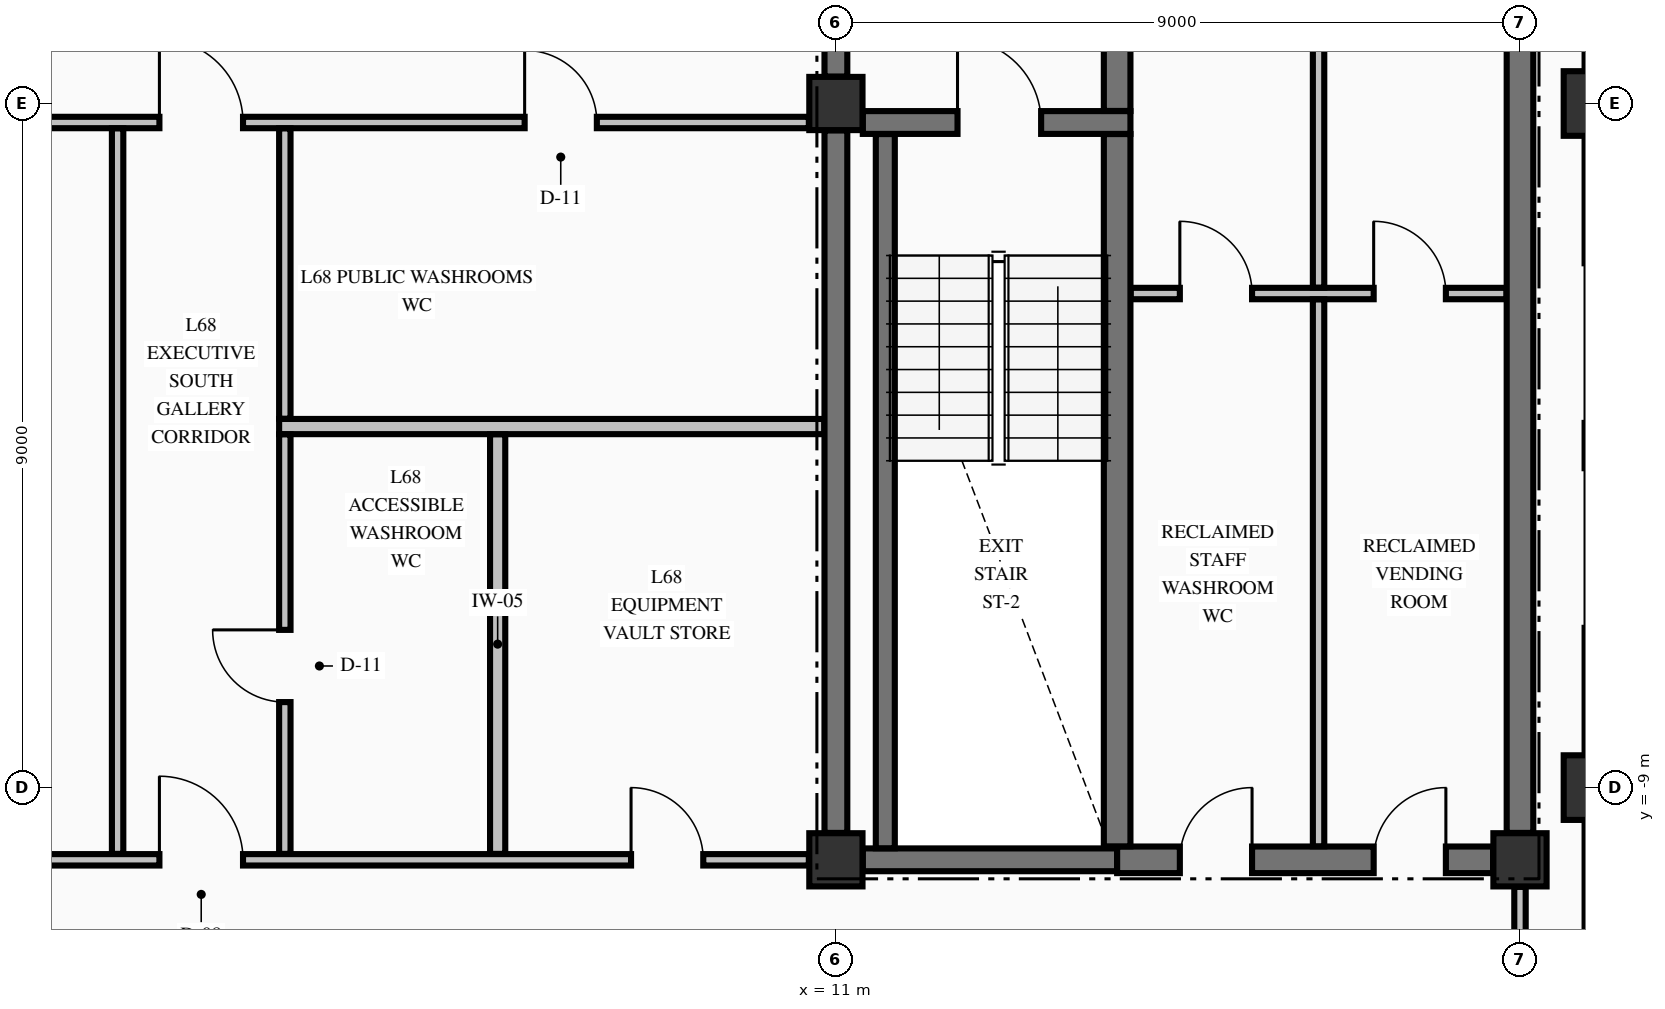
"""IFC4 building model, lengths in metres.
Left out: names, types, materials, properties, quantities, classifications, styles, units other than length and angle.
Written with IfcOpenShell. Run it as: python <this file> out.ifc"""

import sys

from ifc_helpers import new_model, si_unit, direction, frame, frame_2d, origin, origin_2d, place, context, subcontext, project, spatial, rectangle, extrude, element, fill, save


model = new_model("IFC4")
c1 = context("Model", 3, precision=1e-05, world=origin(), true_north=direction((0.0, 1.0)))
c2 = subcontext(c1, "Body", "Model", "MODEL_VIEW")
j1 = project(units=[si_unit("LENGTHUNIT", "METRE"), si_unit("PLANEANGLEUNIT", "RADIAN")], contexts=[c1])
p1 = place(None, origin())
s1 = spatial("IfcSite", under=j1, at=p1, CompositionType="ELEMENT")
p2 = place(p1, origin())
s2 = spatial("IfcBuilding", under=s1, at=p2, CompositionType="ELEMENT")
p3 = place(p2, frame((0.0, 0.0, 257.66)))
s3 = spatial("IfcBuildingStorey", under=s2, at=p3, CompositionType="ELEMENT", Elevation=257.66)
for number, where, z_axis, x_axis in (
    (1, (21.0, -9.0, -0.25), (0.0, 0.0, 1.0), (1.0, 0.0, 0.0)),
    (2, (21.0, 0.0, -0.25), (0.0, 0.0, 1.0), (1.0, 0.0, 0.0)),
):
    element("IfcColumn", number, at=place(p3, frame(where, z_axis=z_axis, x_axis=x_axis)), inside=s3, PredefinedType="COLUMN", context=c2, shape_type="SweptSolid", body=[
        extrude(rectangle(XDim=0.85, YDim=0.85, at=origin_2d()), origin(), (0.0, 0.0, 1.0), 3.23),
    ])
for number, where, z_axis, x_axis in (
    (3, (11.0, -9.95, -0.25), (0.0, 0.0, 1.0), (1.0, 0.0, 0.0)),
    (4, (11.0, 0.0, -0.25), (0.0, 0.0, 1.0), (1.0, 0.0, 0.0)),
    (5, (20.0, -9.95, -0.25), (0.0, 0.0, 1.0), (1.0, 0.0, 0.0)),
):
    element("IfcColumn", number, at=place(p3, frame(where, z_axis=z_axis, x_axis=x_axis)), inside=s3, PredefinedType="COLUMN", context=c2, shape_type="SweptSolid", body=[
        extrude(rectangle(XDim=0.7, YDim=0.7, at=origin_2d()), origin(), (0.0, 0.0, 1.0), 3.23),
    ])
p4 = place(p3, frame((21.0, -17.545, 0.0), z_axis=(0.0, 0.0, 1.0), x_axis=(0.0, 1.0, 0.0)))
e6 = element("IfcWall", 6, at=p4, inside=s3, PredefinedType="STANDARD", context=c2, shape_type="SweptSolid", body=[
    extrude(rectangle(XDim=8.09, YDim=0.3, at=frame_2d((4.045, 0.0))), origin(), (0.0, 0.0, 1.0), 2.372),
])
p5 = place(p3, frame((21.0, -8.545, 0.0), z_axis=(0.0, 0.0, 1.0), x_axis=(0.0, 1.0, 0.0)))
e7 = element("IfcWall", 7, at=p5, inside=s3, PredefinedType="STANDARD", context=c2, shape_type="SweptSolid", body=[
    extrude(rectangle(XDim=8.09, YDim=0.3, at=frame_2d((4.045, 0.0))), origin(), (0.0, 0.0, 1.0), 2.372),
])
p6 = place(p5, frame((1.647, 0.0, 0.7)))
e8 = element("IfcOpeningElement", 8, at=p6, cuts=e7, PredefinedType="OPENING", context=c2, shape_type="SweptSolid", body=[
    extrude(rectangle(XDim=2.1, YDim=1.5, at=frame_2d((1.05, 0.75))), frame((0.0, 0.16, 0.0), z_axis=(0.0, -1.0, 0.0), x_axis=(1.0, 0.0, 0.0)), (0.0, 0.0, 1.0), 0.32),
])
p7 = place(p5, frame((4.343, 0.0, 0.7)))
e9 = element("IfcOpeningElement", 9, at=p7, cuts=e7, PredefinedType="OPENING", context=c2, shape_type="SweptSolid", body=[
    extrude(rectangle(XDim=2.1, YDim=1.5, at=frame_2d((1.05, 0.75))), frame((0.0, 0.16, 0.0), z_axis=(0.0, -1.0, 0.0), x_axis=(1.0, 0.0, 0.0)), (0.0, 0.0, 1.0), 0.32),
])
p8 = place(p3, frame((21.0, 0.455, 0.0), z_axis=(0.0, 0.0, 1.0), x_axis=(0.0, 1.0, 0.0)))
e10 = element("IfcWall", 10, at=p8, inside=s3, PredefinedType="STANDARD", context=c2, shape_type="SweptSolid", body=[
    extrude(rectangle(XDim=8.09, YDim=0.3, at=frame_2d((4.045, 0.0))), origin(), (0.0, 0.0, 1.0), 2.372),
])
p9 = place(p8, frame((1.647, 0.0, 0.7)))
e11 = element("IfcOpeningElement", 11, at=p9, cuts=e10, PredefinedType="OPENING", context=c2, shape_type="SweptSolid", body=[
    extrude(rectangle(XDim=2.1, YDim=1.5, at=frame_2d((1.05, 0.75))), frame((0.0, 0.16, 0.0), z_axis=(0.0, -1.0, 0.0), x_axis=(1.0, 0.0, 0.0)), (0.0, 0.0, 1.0), 0.32),
])
p10 = place(p8, frame((4.343, 0.0, 0.7)))
e12 = element("IfcOpeningElement", 12, at=p10, cuts=e10, PredefinedType="OPENING", context=c2, shape_type="SweptSolid", body=[
    extrude(rectangle(XDim=2.1, YDim=1.5, at=frame_2d((1.05, 0.75))), frame((0.0, 0.16, 0.0), z_axis=(0.0, -1.0, 0.0), x_axis=(1.0, 0.0, 0.0)), (0.0, 0.0, 1.0), 0.32),
])
p11 = place(p3, frame((11.354, -9.95, 0.0), z_axis=(0.0, 0.0, 1.0), x_axis=(1.0, 0.0, 0.0)))
e13 = element("IfcWall", 13, at=p11, inside=s3, PredefinedType="SHEAR", context=c2, shape_type="SweptSolid", body=[
    extrude(rectangle(XDim=3.346, YDim=0.3, at=frame_2d((1.673, 0.0))), origin(), (0.0, 0.0, 1.0), 2.98),
])
p12 = place(p3, frame((14.7, -9.95, 0.0), z_axis=(0.0, 0.0, 1.0), x_axis=(1.0, 0.0, 0.0)))
e14 = element("IfcWall", 14, at=p12, inside=s3, PredefinedType="SHEAR", context=c2, shape_type="SweptSolid", body=[
    extrude(rectangle(XDim=4.946, YDim=0.35, at=frame_2d((2.473, 0.0))), origin(), (0.0, 0.0, 1.0), 2.98),
])
p13 = place(p12, frame((0.825, 0.0, 0.0)))
e15 = element("IfcOpeningElement", 15, at=p13, cuts=e14, PredefinedType="OPENING", context=c2, shape_type="SweptSolid", body=[
    extrude(rectangle(XDim=0.95, YDim=2.15, at=frame_2d((0.475, 1.075))), frame((0.0, 0.185, 0.0), z_axis=(0.0, -1.0, 0.0), x_axis=(1.0, 0.0, 0.0)), (0.0, 0.0, 1.0), 0.37),
])
p14 = place(p12, frame((3.375, 0.0, 0.0)))
e16 = element("IfcOpeningElement", 16, at=p14, cuts=e14, PredefinedType="OPENING", context=c2, shape_type="SweptSolid", body=[
    extrude(rectangle(XDim=0.95, YDim=2.15, at=frame_2d((0.475, 1.075))), frame((0.0, 0.185, 0.0), z_axis=(0.0, -1.0, 0.0), x_axis=(1.0, 0.0, 0.0)), (0.0, 0.0, 1.0), 0.37),
])
p15 = place(p3, frame((11.354, -0.25, 0.0), z_axis=(0.0, 0.0, 1.0), x_axis=(1.0, 0.0, 0.0)))
e17 = element("IfcWall", 17, at=p15, inside=s3, PredefinedType="SHEAR", context=c2, shape_type="SweptSolid", body=[
    extrude(rectangle(XDim=3.521, YDim=0.3, at=frame_2d((1.76, 0.0))), origin(), (0.0, 0.0, 1.0), 2.98),
])
p16 = place(p15, frame((1.246, 0.0, 0.0)))
e18 = element("IfcOpeningElement", 18, at=p16, cuts=e17, PredefinedType="OPENING", context=c2, shape_type="SweptSolid", body=[
    extrude(rectangle(XDim=1.1, YDim=2.15, at=frame_2d((0.55, 1.075))), frame((0.0, 0.16, 0.0), z_axis=(0.0, -1.0, 0.0), x_axis=(1.0, 0.0, 0.0)), (0.0, 0.0, 1.0), 0.32),
])
p17 = place(p3, frame((-10.644, -9.95, 0.0), z_axis=(0.0, 0.0, 1.0), x_axis=(1.0, 0.0, 0.0)))
e19 = element("IfcWall", 19, at=p17, inside=s3, PredefinedType="PARTITIONING", context=c2, shape_type="SweptSolid", body=[
    extrude(rectangle(XDim=21.288, YDim=0.15, at=frame_2d((10.644, 0.0))), origin(), (0.0, 0.0, 1.0), 2.98),
])
p18 = place(p17, frame((12.744, 0.0, 0.0)))
e20 = element("IfcOpeningElement", 20, at=p18, cuts=e19, PredefinedType="OPENING", context=c2, shape_type="SweptSolid", body=[
    extrude(rectangle(XDim=1.1, YDim=2.15, at=frame_2d((0.55, 1.075))), frame((0.0, 0.085, 0.0), z_axis=(0.0, -1.0, 0.0), x_axis=(1.0, 0.0, 0.0)), (0.0, 0.0, 1.0), 0.17),
])
p19 = place(p17, frame((18.949, 0.0, 0.0)))
e21 = element("IfcOpeningElement", 21, at=p19, cuts=e19, PredefinedType="OPENING", context=c2, shape_type="SweptSolid", body=[
    extrude(rectangle(XDim=0.95, YDim=2.15, at=frame_2d((0.475, 1.075))), frame((0.0, 0.085, 0.0), z_axis=(0.0, -1.0, 0.0), x_axis=(1.0, 0.0, 0.0)), (0.0, 0.0, 1.0), 0.17),
])
p20 = place(p3, frame((3.675, -4.25, 0.0), z_axis=(0.0, 0.0, 1.0), x_axis=(1.0, 0.0, 0.0)))
e22 = element("IfcWall", 22, at=p20, inside=s3, PredefinedType="PARTITIONING", context=c2, shape_type="SweptSolid", body=[
    extrude(rectangle(XDim=7.172, YDim=0.2, at=frame_2d((3.586, 0.0))), origin(), (0.0, 0.0, 1.0), 2.98),
])
p21 = place(p3, frame((14.878, -2.5, 0.0), z_axis=(0.0, 0.0, 1.0), x_axis=(1.0, 0.0, 0.0)))
e23 = element("IfcWall", 23, at=p21, inside=s3, PredefinedType="PARTITIONING", context=c2, shape_type="SweptSolid", body=[
    extrude(rectangle(XDim=4.944, YDim=0.15, at=frame_2d((2.472, 0.0))), origin(), (0.0, 0.0, 1.0), 2.98),
])
p22 = place(p21, frame((0.647, 0.0, 0.0)))
e24 = element("IfcOpeningElement", 24, at=p22, cuts=e23, PredefinedType="OPENING", context=c2, shape_type="SweptSolid", body=[
    extrude(rectangle(XDim=0.95, YDim=2.15, at=frame_2d((0.475, 1.075))), frame((0.0, 0.085, 0.0), z_axis=(0.0, -1.0, 0.0), x_axis=(1.0, 0.0, 0.0)), (0.0, 0.0, 1.0), 0.17),
])
p23 = place(p21, frame((3.197, 0.0, 0.0)))
e25 = element("IfcOpeningElement", 25, at=p23, cuts=e23, PredefinedType="OPENING", context=c2, shape_type="SweptSolid", body=[
    extrude(rectangle(XDim=0.95, YDim=2.15, at=frame_2d((0.475, 1.075))), frame((0.0, 0.085, 0.0), z_axis=(0.0, -1.0, 0.0), x_axis=(1.0, 0.0, 0.0)), (0.0, 0.0, 1.0), 0.17),
])
p24 = place(p3, frame((-10.644, -0.25, 0.0), z_axis=(0.0, 0.0, 1.0), x_axis=(1.0, 0.0, 0.0)))
e26 = element("IfcWall", 26, at=p24, inside=s3, PredefinedType="PARTITIONING", context=c2, shape_type="SweptSolid", body=[
    extrude(rectangle(XDim=21.288, YDim=0.15, at=frame_2d((10.644, 0.0))), origin(), (0.0, 0.0, 1.0), 2.98),
])
p25 = place(p24, frame((12.744, 0.0, 0.0)))
e27 = element("IfcOpeningElement", 27, at=p25, cuts=e26, PredefinedType="OPENING", context=c2, shape_type="SweptSolid", body=[
    extrude(rectangle(XDim=1.1, YDim=2.15, at=frame_2d((0.55, 1.075))), frame((0.0, 0.085, 0.0), z_axis=(0.0, -1.0, 0.0), x_axis=(1.0, 0.0, 0.0)), (0.0, 0.0, 1.0), 0.17),
])
p26 = place(p24, frame((5.399, 0.0, 0.0)))
e28 = element("IfcOpeningElement", 28, at=p26, cuts=e26, PredefinedType="OPENING", context=c2, shape_type="SweptSolid", body=[
    extrude(rectangle(XDim=1.05, YDim=2.15, at=frame_2d((0.525, 1.075))), frame((0.0, 0.085, 0.0), z_axis=(0.0, -1.0, 0.0), x_axis=(1.0, 0.0, 0.0)), (0.0, 0.0, 1.0), 0.17),
])
p27 = place(p24, frame((17.549, 0.0, 0.0)))
e29 = element("IfcOpeningElement", 29, at=p27, cuts=e26, PredefinedType="OPENING", context=c2, shape_type="SweptSolid", body=[
    extrude(rectangle(XDim=0.95, YDim=2.15, at=frame_2d((0.475, 1.075))), frame((0.0, 0.085, 0.0), z_axis=(0.0, -1.0, 0.0), x_axis=(1.0, 0.0, 0.0)), (0.0, 0.0, 1.0), 0.17),
])
p28 = place(p3, frame((11.0, -9.596, 0.0), z_axis=(0.0, 0.0, 1.0), x_axis=(0.0, 1.0, 0.0)))
e30 = element("IfcWall", 30, at=p28, inside=s3, PredefinedType="SHEAR", context=c2, shape_type="SweptSolid", body=[
    extrude(rectangle(XDim=9.242, YDim=0.3, at=frame_2d((4.621, 0.0))), origin(), (0.0, 0.0, 1.0), 2.98),
])
p29 = place(p3, frame((11.0, 0.354, 0.0), z_axis=(0.0, 0.0, 1.0), x_axis=(0.0, 1.0, 0.0)))
e31 = element("IfcWall", 31, at=p29, inside=s3, PredefinedType="SHEAR", context=c2, shape_type="SweptSolid", body=[
    extrude(rectangle(XDim=2.394, YDim=0.3, at=frame_2d((1.197, 0.0))), origin(), (0.0, 0.0, 1.0), 2.98),
])
p30 = place(p29, frame((0.746, 0.0, 0.0)))
e32 = element("IfcOpeningElement", 32, at=p30, cuts=e31, PredefinedType="OPENING", context=c2, shape_type="SweptSolid", body=[
    extrude(rectangle(XDim=1.1, YDim=2.15, at=frame_2d((0.55, 1.075))), frame((0.0, 0.16, 0.0), z_axis=(0.0, -1.0, 0.0), x_axis=(1.0, 0.0, 0.0)), (0.0, 0.0, 1.0), 0.32),
])
p31 = place(p3, frame((11.65, -9.798, 0.0), z_axis=(0.0, 0.0, 1.0), x_axis=(0.0, 1.0, 0.0)))
e33 = element("IfcWall", 33, at=p31, inside=s3, PredefinedType="SOLIDWALL", context=c2, shape_type="SweptSolid", body=[
    extrude(rectangle(XDim=9.396, YDim=0.25, at=frame_2d((4.698, 0.0))), origin(), (0.0, 0.0, 1.0), 2.98),
])
p32 = place(p3, frame((14.7, -9.773, 0.0), z_axis=(0.0, 0.0, 1.0), x_axis=(0.0, 1.0, 0.0)))
e34 = element("IfcWall", 34, at=p32, inside=s3, PredefinedType="SHEAR", context=c2, shape_type="SweptSolid", body=[
    extrude(rectangle(XDim=9.371, YDim=0.35, at=frame_2d((4.686, 0.0))), origin(), (0.0, 0.0, 1.0), 2.98),
])
p33 = place(p3, frame((14.7, -0.098, 0.0), z_axis=(0.0, 0.0, 1.0), x_axis=(0.0, 1.0, 0.0)))
e35 = element("IfcWall", 35, at=p33, inside=s3, PredefinedType="SHEAR", context=c2, shape_type="SweptSolid", body=[
    extrude(rectangle(XDim=2.846, YDim=0.35, at=frame_2d((1.423, 0.0))), origin(), (0.0, 0.0, 1.0), 2.98),
])
p34 = place(p3, frame((20.0, -9.596, 0.0), z_axis=(0.0, 0.0, 1.0), x_axis=(0.0, 1.0, 0.0)))
e36 = element("IfcWall", 36, at=p34, inside=s3, PredefinedType="SHEAR", context=c2, shape_type="SweptSolid", body=[
    extrude(rectangle(XDim=14.769, YDim=0.35, at=frame_2d((7.385, 0.0))), origin(), (0.0, 0.0, 1.0), 2.98),
])
p35 = place(p3, frame((1.55, -9.872, 0.0), z_axis=(0.0, 0.0, 1.0), x_axis=(0.0, 1.0, 0.0)))
e37 = element("IfcWall", 37, at=p35, inside=s3, PredefinedType="PARTITIONING", context=c2, shape_type="SweptSolid", body=[
    extrude(rectangle(XDim=9.544, YDim=0.15, at=frame_2d((4.772, 0.0))), origin(), (0.0, 0.0, 1.0), 2.98),
])
p36 = place(p3, frame((3.75, -9.872, 0.0), z_axis=(0.0, 0.0, 1.0), x_axis=(0.0, 1.0, 0.0)))
e38 = element("IfcWall", 38, at=p36, inside=s3, PredefinedType="PARTITIONING", context=c2, shape_type="SweptSolid", body=[
    extrude(rectangle(XDim=5.519, YDim=0.15, at=frame_2d((2.76, 0.0))), origin(), (0.0, 0.0, 1.0), 2.98),
])
p37 = place(p36, frame((1.997, 0.0, 0.0)))
e39 = element("IfcOpeningElement", 39, at=p37, cuts=e38, PredefinedType="OPENING", context=c2, shape_type="SweptSolid", body=[
    extrude(rectangle(XDim=0.95, YDim=2.15, at=frame_2d((0.475, 1.075))), frame((0.0, 0.085, 0.0), z_axis=(0.0, -1.0, 0.0), x_axis=(1.0, 0.0, 0.0)), (0.0, 0.0, 1.0), 0.17),
])
p38 = place(p3, frame((3.75, -4.147, 0.0), z_axis=(0.0, 0.0, 1.0), x_axis=(0.0, 1.0, 0.0)))
e40 = element("IfcWall", 40, at=p38, inside=s3, PredefinedType="PARTITIONING", context=c2, shape_type="SweptSolid", body=[
    extrude(rectangle(XDim=3.819, YDim=0.15, at=frame_2d((1.91, 0.0))), origin(), (0.0, 0.0, 1.0), 2.98),
])
p39 = place(p3, frame((6.55, -9.872, 0.0), z_axis=(0.0, 0.0, 1.0), x_axis=(0.0, 1.0, 0.0)))
e41 = element("IfcWall", 41, at=p39, inside=s3, PredefinedType="PARTITIONING", context=c2, shape_type="SweptSolid", body=[
    extrude(rectangle(XDim=5.519, YDim=0.2, at=frame_2d((2.76, 0.0))), origin(), (0.0, 0.0, 1.0), 2.98),
])
p40 = place(p3, frame((17.35, -9.772, 0.0), z_axis=(0.0, 0.0, 1.0), x_axis=(0.0, 1.0, 0.0)))
e42 = element("IfcWall", 42, at=p40, inside=s3, PredefinedType="PARTITIONING", context=c2, shape_type="SweptSolid", body=[
    extrude(rectangle(XDim=7.194, YDim=0.15, at=frame_2d((3.597, 0.0))), origin(), (0.0, 0.0, 1.0), 2.98),
])
p41 = place(p3, frame((17.35, -2.422, 0.0), z_axis=(0.0, 0.0, 1.0), x_axis=(0.0, 1.0, 0.0)))
e43 = element("IfcWall", 43, at=p41, inside=s3, PredefinedType="PARTITIONING", context=c2, shape_type="SweptSolid", body=[
    extrude(rectangle(XDim=7.144, YDim=0.15, at=frame_2d((3.572, 0.0))), origin(), (0.0, 0.0, 1.0), 2.98),
])
p42 = place(p3, frame((20.0, -12.672, 0.0), z_axis=(0.0, 0.0, 1.0), x_axis=(0.0, 1.0, 0.0)))
e44 = element("IfcWall", 44, at=p42, inside=s3, PredefinedType="PARTITIONING", context=c2, shape_type="SweptSolid", body=[
    extrude(rectangle(XDim=2.366, YDim=0.15, at=frame_2d((1.183, 0.0))), origin(), (0.0, 0.0, 1.0), 2.57),
])
p43 = place(p16, origin())
e45 = element("IfcDoor", 45, at=p43, inside=s3, OperationType="SINGLE_SWING_LEFT", PredefinedType="DOOR", context=c2, shape_type="SweptSolid", body=[
    extrude(rectangle(XDim=1.1, YDim=2.15, at=frame_2d((0.55, 1.075))), frame((0.0, 0.025, 0.0), z_axis=(0.0, -1.0, 0.0), x_axis=(1.0, 0.0, 0.0)), (0.0, 0.0, 1.0), 0.05),
])
fill(e18, e45)
p44 = place(p13, origin())
e46 = element("IfcDoor", 46, at=p44, inside=s3, OperationType="SINGLE_SWING_RIGHT", PredefinedType="DOOR", context=c2, shape_type="SweptSolid", body=[
    extrude(rectangle(XDim=0.95, YDim=2.15, at=frame_2d((0.475, 1.075))), frame((0.0, 0.025, 0.0), z_axis=(0.0, -1.0, 0.0), x_axis=(1.0, 0.0, 0.0)), (0.0, 0.0, 1.0), 0.05),
])
fill(e15, e46)
p45 = place(p22, origin())
e47 = element("IfcDoor", 47, at=p45, inside=s3, OperationType="SINGLE_SWING_LEFT", PredefinedType="DOOR", context=c2, shape_type="SweptSolid", body=[
    extrude(rectangle(XDim=0.95, YDim=2.15, at=frame_2d((0.475, 1.075))), frame((0.0, 0.025, 0.0), z_axis=(0.0, -1.0, 0.0), x_axis=(1.0, 0.0, 0.0)), (0.0, 0.0, 1.0), 0.05),
])
fill(e24, e47)
p46 = place(p14, origin())
e48 = element("IfcDoor", 48, at=p46, inside=s3, OperationType="SINGLE_SWING_RIGHT", PredefinedType="DOOR", context=c2, shape_type="SweptSolid", body=[
    extrude(rectangle(XDim=0.95, YDim=2.15, at=frame_2d((0.475, 1.075))), frame((0.0, 0.025, 0.0), z_axis=(0.0, -1.0, 0.0), x_axis=(1.0, 0.0, 0.0)), (0.0, 0.0, 1.0), 0.05),
])
fill(e16, e48)
p47 = place(p23, origin())
e49 = element("IfcDoor", 49, at=p47, inside=s3, OperationType="SINGLE_SWING_LEFT", PredefinedType="DOOR", context=c2, shape_type="SweptSolid", body=[
    extrude(rectangle(XDim=0.95, YDim=2.15, at=frame_2d((0.475, 1.075))), frame((0.0, 0.025, 0.0), z_axis=(0.0, -1.0, 0.0), x_axis=(1.0, 0.0, 0.0)), (0.0, 0.0, 1.0), 0.05),
])
fill(e25, e49)
p48 = place(p18, origin())
e50 = element("IfcDoor", 50, at=p48, inside=s3, OperationType="SINGLE_SWING_LEFT", PredefinedType="DOOR", context=c2, shape_type="SweptSolid", body=[
    extrude(rectangle(XDim=1.1, YDim=2.15, at=frame_2d((0.55, 1.075))), frame((0.0, 0.025, 0.0), z_axis=(0.0, -1.0, 0.0), x_axis=(1.0, 0.0, 0.0)), (0.0, 0.0, 1.0), 0.05),
])
fill(e20, e50)
p49 = place(p25, origin())
e51 = element("IfcDoor", 51, at=p49, inside=s3, OperationType="SINGLE_SWING_LEFT", PredefinedType="DOOR", context=c2, shape_type="SweptSolid", body=[
    extrude(rectangle(XDim=1.1, YDim=2.15, at=frame_2d((0.55, 1.075))), frame((0.0, 0.025, 0.0), z_axis=(0.0, -1.0, 0.0), x_axis=(1.0, 0.0, 0.0)), (0.0, 0.0, 1.0), 0.05),
])
fill(e27, e51)
p50 = place(p27, origin())
e52 = element("IfcDoor", 52, at=p50, inside=s3, OperationType="SINGLE_SWING_LEFT", PredefinedType="DOOR", context=c2, shape_type="SweptSolid", body=[
    extrude(rectangle(XDim=0.95, YDim=2.15, at=frame_2d((0.475, 1.075))), frame((0.0, 0.025, 0.0), z_axis=(0.0, -1.0, 0.0), x_axis=(1.0, 0.0, 0.0)), (0.0, 0.0, 1.0), 0.05),
])
fill(e29, e52)
p51 = place(p37, origin())
e53 = element("IfcDoor", 53, at=p51, inside=s3, OperationType="SINGLE_SWING_RIGHT", PredefinedType="DOOR", context=c2, shape_type="SweptSolid", body=[
    extrude(rectangle(XDim=0.95, YDim=2.15, at=frame_2d((0.475, 1.075))), frame((0.0, 0.025, 0.0), z_axis=(0.0, -1.0, 0.0), x_axis=(1.0, 0.0, 0.0)), (0.0, 0.0, 1.0), 0.05),
])
fill(e39, e53)
p52 = place(p19, origin())
e54 = element("IfcDoor", 54, at=p52, inside=s3, OperationType="SINGLE_SWING_LEFT", PredefinedType="DOOR", context=c2, shape_type="SweptSolid", body=[
    extrude(rectangle(XDim=0.95, YDim=2.15, at=frame_2d((0.475, 1.075))), frame((0.0, 0.025, 0.0), z_axis=(0.0, -1.0, 0.0), x_axis=(1.0, 0.0, 0.0)), (0.0, 0.0, 1.0), 0.05),
])
fill(e21, e54)
save(model, sys.argv[1])
